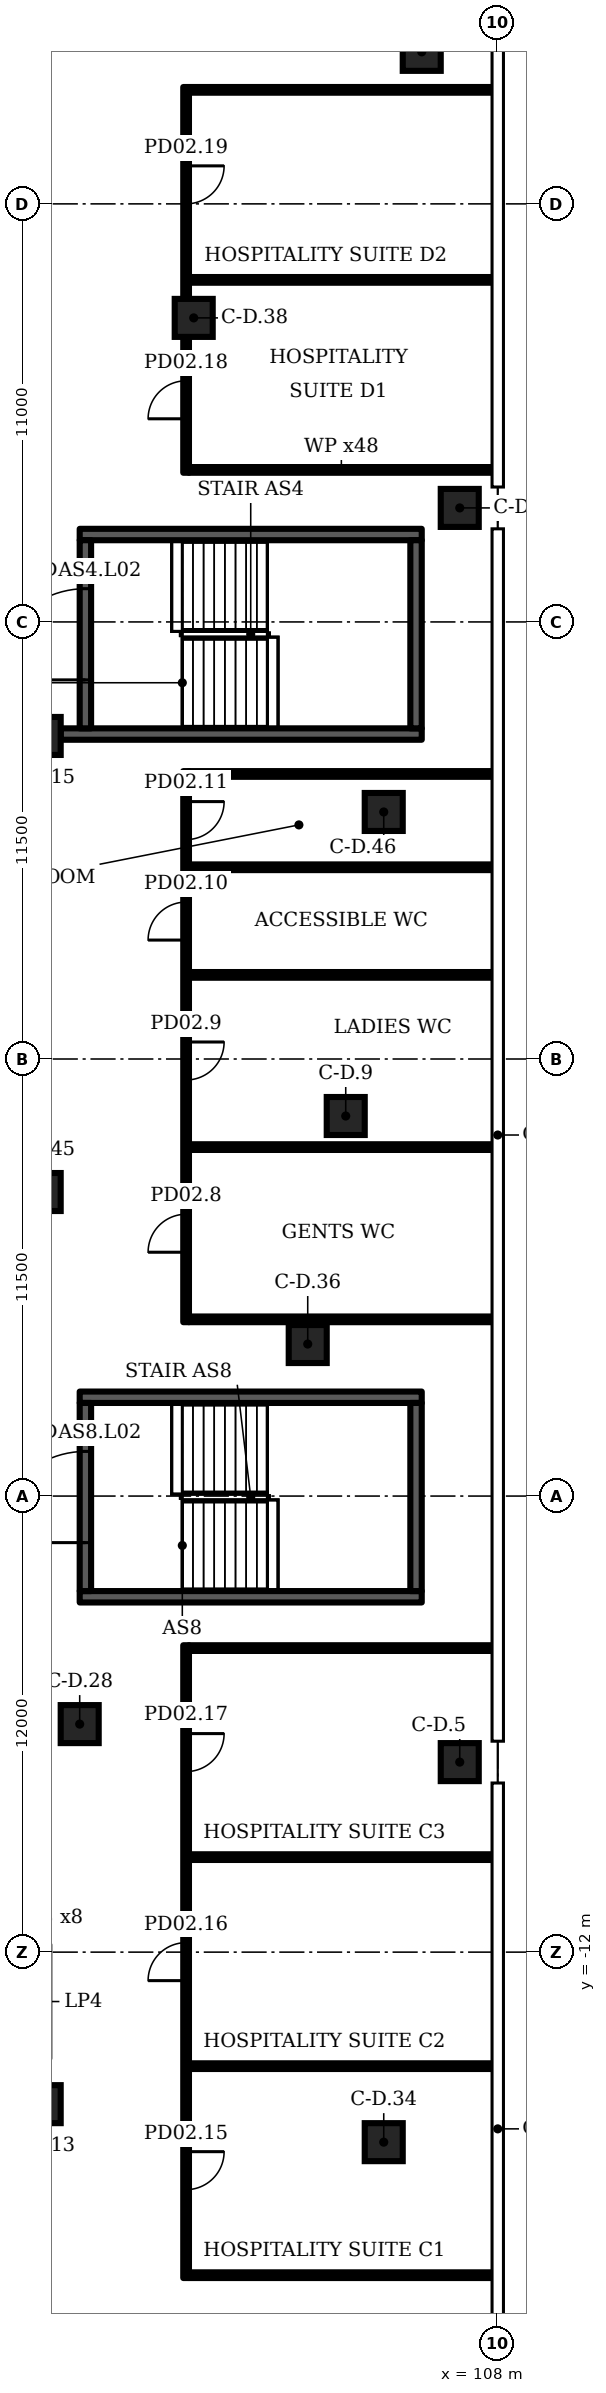
"""IFC4 building model, lengths in metres.
Left out: names, types, materials, properties, quantities, classifications, styles, units other than length and angle.
Written with IfcOpenShell. Run it as: python <this file> out.ifc"""

import sys

from ifc_helpers import new_model, si_unit, direction, frame, frame_2d, origin, origin_2d, place, context, subcontext, project, spatial, rectangle, extrude, element, fill, save


model = new_model("IFC4")
c1 = context("Model", 3, precision=1e-05, world=origin(), true_north=direction((0.0, 1.0)))
c2 = subcontext(c1, "Body", "Model", "MODEL_VIEW")
j1 = project(units=[si_unit("LENGTHUNIT", "METRE"), si_unit("PLANEANGLEUNIT", "RADIAN")], contexts=[c1])
p1 = place(None, origin())
s1 = spatial("IfcSite", under=j1, at=p1, CompositionType="ELEMENT")
p2 = place(p1, origin())
s2 = spatial("IfcBuilding", under=s1, at=p2, CompositionType="ELEMENT")
p3 = place(p2, frame((0.0, 0.0, 15.0)))
s3 = spatial("IfcBuildingStorey", under=s2, at=p3, CompositionType="ELEMENT", Elevation=15.0)
for number, where, z_axis, x_axis in (
    (1, (107.0, 26.0, 0.0), (0.0, 0.0, 1.0), (1.0, 0.0, 0.0)),
    (2, (107.0, -7.0, 0.0), (0.0, 0.0, 1.0), (1.0, 0.0, 0.0)),
    (3, (104.0, 10.0, 0.0), (0.0, 0.0, 1.0), (1.0, 0.0, 0.0)),
    (4, (96.0, -16.0, 0.0), (0.0, 0.0, 1.0), (1.0, 0.0, 0.0)),
    (5, (96.0, 20.0, 0.0), (0.0, 0.0, 1.0), (1.0, 0.0, 0.0)),
    (6, (106.0, 38.0, 0.0), (0.0, 0.0, 1.0), (1.0, 0.0, 0.0)),
    (7, (97.0, -6.0, 0.0), (0.0, 0.0, 1.0), (1.0, 0.0, 0.0)),
    (8, (105.0, -17.0, 0.0), (0.0, 0.0, 1.0), (1.0, 0.0, 0.0)),
    (9, (103.0, 4.0, 0.0), (0.0, 0.0, 1.0), (1.0, 0.0, 0.0)),
    (10, (100.0, 31.0, 0.0), (0.0, 0.0, 1.0), (1.0, 0.0, 0.0)),
    (11, (96.0, 8.0, 0.0), (0.0, 0.0, 1.0), (1.0, 0.0, 0.0)),
    (12, (105.0, 18.0, 0.0), (0.0, 0.0, 1.0), (1.0, 0.0, 0.0)),
):
    element("IfcColumn", number, at=place(p3, frame(where, z_axis=z_axis, x_axis=x_axis)), inside=s3, PredefinedType="COLUMN", context=c2, shape_type="SweptSolid", body=[
        extrude(rectangle(XDim=1.0, YDim=1.0, at=origin_2d()), origin(), (0.0, 0.0, 1.0), 6.5),
    ])
for number, where, z_axis, x_axis in (
    (13, (99.875, -20.5, 0.0), (0.0, 0.0, 1.0), (1.0, 0.0, 0.0)),
    (14, (99.875, -15.0, 0.0), (0.0, 0.0, 1.0), (1.0, 0.0, 0.0)),
    (15, (99.875, -9.5, 0.0), (0.0, 0.0, 1.0), (1.0, 0.0, 0.0)),
    (16, (99.875, -4.0, 0.0), (0.0, 0.0, 1.0), (1.0, 0.0, 0.0)),
    (17, (99.875, 19.0, 0.0), (0.0, 0.0, 1.0), (1.0, 0.0, 0.0)),
    (18, (99.875, 4.65, 0.0), (0.0, 0.0, 1.0), (1.0, 0.0, 0.0)),
    (19, (99.875, 9.182, 0.0), (0.0, 0.0, 1.0), (1.0, 0.0, 0.0)),
):
    element("IfcWall", number, at=place(p3, frame(where, z_axis=z_axis, x_axis=x_axis)), inside=s3, PredefinedType="PARTITIONING", context=c2, shape_type="SweptSolid", body=[
        extrude(rectangle(XDim=8.02, YDim=0.15, at=frame_2d((4.01, 0.0))), origin(), (0.0, 0.0, 1.0), 6.2),
    ])
p4 = place(p3, frame((99.8, -20.575, 0.0), z_axis=(0.0, 0.0, 1.0), x_axis=(0.0, 1.0, 0.0)))
e20 = element("IfcWall", 20, at=p4, inside=s3, PredefinedType="PARTITIONING", context=c2, shape_type="SweptSolid", body=[
    extrude(rectangle(XDim=16.65, YDim=0.15, at=frame_2d((8.325, 0.0))), origin(), (0.0, 0.0, 1.0), 6.2),
])
p5 = place(p4, frame((2.325, 0.0, 0.0)))
e21 = element("IfcOpeningElement", 21, at=p5, cuts=e20, PredefinedType="OPENING", context=c2, shape_type="SweptSolid", body=[
    extrude(rectangle(XDim=1.0, YDim=2.1, at=frame_2d((0.5, 1.05))), frame((0.0, 0.085, 0.0), z_axis=(0.0, -1.0, 0.0), x_axis=(1.0, 0.0, 0.0)), (0.0, 0.0, 1.0), 0.17),
])
p6 = place(p4, frame((7.825, 0.0, 0.0)))
e22 = element("IfcOpeningElement", 22, at=p6, cuts=e20, PredefinedType="OPENING", context=c2, shape_type="SweptSolid", body=[
    extrude(rectangle(XDim=1.0, YDim=2.1, at=frame_2d((0.5, 1.05))), frame((0.0, 0.085, 0.0), z_axis=(0.0, -1.0, 0.0), x_axis=(1.0, 0.0, 0.0)), (0.0, 0.0, 1.0), 0.17),
])
p7 = place(p4, frame((13.325, 0.0, 0.0)))
e23 = element("IfcOpeningElement", 23, at=p7, cuts=e20, PredefinedType="OPENING", context=c2, shape_type="SweptSolid", body=[
    extrude(rectangle(XDim=1.0, YDim=2.1, at=frame_2d((0.5, 1.05))), frame((0.0, 0.085, 0.0), z_axis=(0.0, -1.0, 0.0), x_axis=(1.0, 0.0, 0.0)), (0.0, 0.0, 1.0), 0.17),
])
p8 = place(p3, frame((99.8, 4.575, 0.0), z_axis=(0.0, 0.0, 1.0), x_axis=(0.0, 1.0, 0.0)))
e24 = element("IfcWall", 24, at=p8, inside=s3, PredefinedType="PARTITIONING", context=c2, shape_type="SweptSolid", body=[
    extrude(rectangle(XDim=14.5, YDim=0.15, at=frame_2d((7.25, 0.0))), origin(), (0.0, 0.0, 1.0), 6.2),
])
p9 = place(p8, frame((1.841, 0.0, 0.0)))
e25 = element("IfcOpeningElement", 25, at=p9, cuts=e24, PredefinedType="OPENING", context=c2, shape_type="SweptSolid", body=[
    extrude(rectangle(XDim=1.0, YDim=2.1, at=frame_2d((0.5, 1.05))), frame((0.0, 0.085, 0.0), z_axis=(0.0, -1.0, 0.0), x_axis=(1.0, 0.0, 0.0)), (0.0, 0.0, 1.0), 0.17),
])
p10 = place(p8, frame((6.372, 0.0, 0.0)))
e26 = element("IfcOpeningElement", 26, at=p10, cuts=e24, PredefinedType="OPENING", context=c2, shape_type="SweptSolid", body=[
    extrude(rectangle(XDim=1.0, YDim=2.1, at=frame_2d((0.5, 1.05))), frame((0.0, 0.085, 0.0), z_axis=(0.0, -1.0, 0.0), x_axis=(1.0, 0.0, 0.0)), (0.0, 0.0, 1.0), 0.17),
])
p11 = place(p8, frame((10.054, 0.0, 0.0)))
e27 = element("IfcOpeningElement", 27, at=p11, cuts=e24, PredefinedType="OPENING", context=c2, shape_type="SweptSolid", body=[
    extrude(rectangle(XDim=1.0, YDim=2.1, at=frame_2d((0.5, 1.05))), frame((0.0, 0.085, 0.0), z_axis=(0.0, -1.0, 0.0), x_axis=(1.0, 0.0, 0.0)), (0.0, 0.0, 1.0), 0.17),
])
p12 = place(p8, frame((12.698, 0.0, 0.0)))
e28 = element("IfcOpeningElement", 28, at=p12, cuts=e24, PredefinedType="OPENING", context=c2, shape_type="SweptSolid", body=[
    extrude(rectangle(XDim=1.0, YDim=2.1, at=frame_2d((0.5, 1.05))), frame((0.0, 0.085, 0.0), z_axis=(0.0, -1.0, 0.0), x_axis=(1.0, 0.0, 0.0)), (0.0, 0.0, 1.0), 0.17),
])
p13 = place(p3, frame((99.8, 26.925, 0.0), z_axis=(0.0, 0.0, 1.0), x_axis=(0.0, 1.0, 0.0)))
e29 = element("IfcWall", 29, at=p13, inside=s3, PredefinedType="PARTITIONING", context=c2, shape_type="SweptSolid", body=[
    extrude(rectangle(XDim=3.565, YDim=0.15, at=frame_2d((1.782, 0.0))), origin(), (0.0, 0.0, 1.0), 6.2),
])
p14 = place(p13, frame((1.42, 0.0, 0.0)))
e30 = element("IfcOpeningElement", 30, at=p14, cuts=e29, PredefinedType="OPENING", context=c2, shape_type="SweptSolid", body=[
    extrude(rectangle(XDim=1.0, YDim=2.1, at=frame_2d((0.5, 1.05))), frame((0.0, 0.085, 0.0), z_axis=(0.0, -1.0, 0.0), x_axis=(1.0, 0.0, 0.0)), (0.0, 0.0, 1.0), 0.17),
])
p15 = place(p3, frame((99.8, 31.51, 0.0), z_axis=(0.0, 0.0, 1.0), x_axis=(0.0, 1.0, 0.0)))
e31 = element("IfcWall", 31, at=p15, inside=s3, PredefinedType="PARTITIONING", context=c2, shape_type="SweptSolid", body=[
    extrude(rectangle(XDim=5.565, YDim=0.15, at=frame_2d((2.782, 0.0))), origin(), (0.0, 0.0, 1.0), 6.2),
])
p16 = place(p15, frame((2.49, 0.0, 0.0)))
e32 = element("IfcOpeningElement", 32, at=p16, cuts=e31, PredefinedType="OPENING", context=c2, shape_type="SweptSolid", body=[
    extrude(rectangle(XDim=1.0, YDim=2.1, at=frame_2d((0.5, 1.05))), frame((0.0, 0.085, 0.0), z_axis=(0.0, -1.0, 0.0), x_axis=(1.0, 0.0, 0.0)), (0.0, 0.0, 1.0), 0.17),
])
for number, where, z_axis, x_axis in (
    (33, (99.875, 13.713, 0.0), (0.0, 0.0, 1.0), (1.0, 0.0, 0.0)),
    (34, (99.875, 16.545, 0.0), (0.0, 0.0, 1.0), (1.0, 0.0, 0.0)),
    (35, (99.875, 27.0, 0.0), (0.0, 0.0, 1.0), (1.0, 0.0, 0.0)),
    (36, (99.875, 32.0, 0.0), (0.0, 0.0, 1.0), (1.0, 0.0, 0.0)),
    (37, (99.875, 37.0, 0.0), (0.0, 0.0, 1.0), (1.0, 0.0, 0.0)),
):
    element("IfcWall", number, at=place(p3, frame(where, z_axis=z_axis, x_axis=x_axis)), inside=s3, PredefinedType="PARTITIONING", context=c2, shape_type="SweptSolid", body=[
        extrude(rectangle(XDim=8.02, YDim=0.15, at=frame_2d((4.01, 0.0))), origin(), (0.0, 0.0, 1.0), 6.2),
    ])
for number, where, z_axis, x_axis in (
    (38, (97.0, -2.65, 0.0), (0.0, 0.0, 1.0), (1.0, 0.0, 0.0)),
    (39, (97.0, 2.6, 0.0), (0.0, 0.0, 1.0), (1.0, 0.0, 0.0)),
):
    element("IfcWall", number, at=place(p3, frame(where, z_axis=z_axis, x_axis=x_axis)), inside=s3, PredefinedType="SHEAR", context=c2, shape_type="SweptSolid", body=[
        extrude(rectangle(XDim=9.0, YDim=0.3, at=frame_2d((4.5, 0.0))), origin(), (0.0, 0.0, 1.0), 6.2),
    ])
p17 = place(p3, frame((97.15, -2.5, 0.0), z_axis=(0.0, 0.0, 1.0), x_axis=(0.0, 1.0, 0.0)))
e40 = element("IfcWall", 40, at=p17, inside=s3, PredefinedType="SHEAR", context=c2, shape_type="SweptSolid", body=[
    extrude(rectangle(XDim=4.95, YDim=0.3, at=frame_2d((2.475, 0.0))), origin(), (0.0, 0.0, 1.0), 6.2),
])
p18 = place(p17, frame((1.275, 0.0, 0.0)))
e41 = element("IfcOpeningElement", 41, at=p18, cuts=e40, PredefinedType="OPENING", context=c2, shape_type="SweptSolid", body=[
    extrude(rectangle(XDim=2.4, YDim=2.1, at=frame_2d((1.2, 1.05))), frame((0.0, 0.16, 0.0), z_axis=(0.0, -1.0, 0.0), x_axis=(1.0, 0.0, 0.0)), (0.0, 0.0, 1.0), 0.32),
])
p19 = place(p3, frame((105.85, -2.5, 0.0), z_axis=(0.0, 0.0, 1.0), x_axis=(0.0, 1.0, 0.0)))
e42 = element("IfcWall", 42, at=p19, inside=s3, PredefinedType="SHEAR", context=c2, shape_type="SweptSolid", body=[
    extrude(rectangle(XDim=4.95, YDim=0.3, at=frame_2d((2.475, 0.0))), origin(), (0.0, 0.0, 1.0), 6.2),
])
p20 = place(p3, frame((96.5, 20.05, 0.0), z_axis=(0.0, 0.0, 1.0), x_axis=(1.0, 0.0, 0.0)))
e43 = element("IfcWall", 43, at=p20, inside=s3, PredefinedType="SHEAR", context=c2, shape_type="SweptSolid", body=[
    extrude(rectangle(XDim=9.5, YDim=0.3, at=frame_2d((4.75, 0.0))), origin(), (0.0, 0.0, 1.0), 6.2),
])
p21 = place(p3, frame((97.0, 25.3, 0.0), z_axis=(0.0, 0.0, 1.0), x_axis=(1.0, 0.0, 0.0)))
e44 = element("IfcWall", 44, at=p21, inside=s3, PredefinedType="SHEAR", context=c2, shape_type="SweptSolid", body=[
    extrude(rectangle(XDim=9.0, YDim=0.3, at=frame_2d((4.5, 0.0))), origin(), (0.0, 0.0, 1.0), 6.2),
])
p22 = place(p3, frame((97.15, 20.2, 0.0), z_axis=(0.0, 0.0, 1.0), x_axis=(0.0, 1.0, 0.0)))
e45 = element("IfcWall", 45, at=p22, inside=s3, PredefinedType="SHEAR", context=c2, shape_type="SweptSolid", body=[
    extrude(rectangle(XDim=4.95, YDim=0.3, at=frame_2d((2.475, 0.0))), origin(), (0.0, 0.0, 1.0), 6.2),
])
p23 = place(p22, frame((1.275, 0.0, 0.0)))
e46 = element("IfcOpeningElement", 46, at=p23, cuts=e45, PredefinedType="OPENING", context=c2, shape_type="SweptSolid", body=[
    extrude(rectangle(XDim=2.4, YDim=2.1, at=frame_2d((1.2, 1.05))), frame((0.0, 0.16, 0.0), z_axis=(0.0, -1.0, 0.0), x_axis=(1.0, 0.0, 0.0)), (0.0, 0.0, 1.0), 0.32),
])
p24 = place(p3, frame((105.85, 20.2, 0.0), z_axis=(0.0, 0.0, 1.0), x_axis=(0.0, 1.0, 0.0)))
e47 = element("IfcWall", 47, at=p24, inside=s3, PredefinedType="SHEAR", context=c2, shape_type="SweptSolid", body=[
    extrude(rectangle(XDim=4.95, YDim=0.3, at=frame_2d((2.475, 0.0))), origin(), (0.0, 0.0, 1.0), 6.2),
])
p25 = place(p9, origin())
e48 = element("IfcDoor", 48, at=p25, inside=s3, OperationType="SINGLE_SWING_LEFT", PredefinedType="DOOR", context=c2, shape_type="SweptSolid", body=[
    extrude(rectangle(XDim=1.0, YDim=2.1, at=frame_2d((0.5, 1.05))), frame((0.0, 0.025, 0.0), z_axis=(0.0, -1.0, 0.0), x_axis=(1.0, 0.0, 0.0)), (0.0, 0.0, 1.0), 0.05),
])
fill(e25, e48)
p26 = place(p10, origin())
e49 = element("IfcDoor", 49, at=p26, inside=s3, OperationType="SINGLE_SWING_RIGHT", PredefinedType="DOOR", context=c2, shape_type="SweptSolid", body=[
    extrude(rectangle(XDim=1.0, YDim=2.1, at=frame_2d((0.5, 1.05))), frame((0.0, 0.025, 0.0), z_axis=(0.0, -1.0, 0.0), x_axis=(1.0, 0.0, 0.0)), (0.0, 0.0, 1.0), 0.05),
])
fill(e26, e49)
p27 = place(p11, origin())
e50 = element("IfcDoor", 50, at=p27, inside=s3, OperationType="SINGLE_SWING_LEFT", PredefinedType="DOOR", context=c2, shape_type="SweptSolid", body=[
    extrude(rectangle(XDim=1.0, YDim=2.1, at=frame_2d((0.5, 1.05))), frame((0.0, 0.025, 0.0), z_axis=(0.0, -1.0, 0.0), x_axis=(1.0, 0.0, 0.0)), (0.0, 0.0, 1.0), 0.05),
])
fill(e27, e50)
p28 = place(p12, origin())
e51 = element("IfcDoor", 51, at=p28, inside=s3, OperationType="SINGLE_SWING_RIGHT", PredefinedType="DOOR", context=c2, shape_type="SweptSolid", body=[
    extrude(rectangle(XDim=1.0, YDim=2.1, at=frame_2d((0.5, 1.05))), frame((0.0, 0.025, 0.0), z_axis=(0.0, -1.0, 0.0), x_axis=(1.0, 0.0, 0.0)), (0.0, 0.0, 1.0), 0.05),
])
fill(e28, e51)
p29 = place(p5, origin())
e52 = element("IfcDoor", 52, at=p29, inside=s3, OperationType="SINGLE_SWING_RIGHT", PredefinedType="DOOR", context=c2, shape_type="SweptSolid", body=[
    extrude(rectangle(XDim=1.0, YDim=2.1, at=frame_2d((0.5, 1.05))), frame((0.0, 0.025, 0.0), z_axis=(0.0, -1.0, 0.0), x_axis=(1.0, 0.0, 0.0)), (0.0, 0.0, 1.0), 0.05),
])
fill(e21, e52)
p30 = place(p6, origin())
e53 = element("IfcDoor", 53, at=p30, inside=s3, OperationType="SINGLE_SWING_LEFT", PredefinedType="DOOR", context=c2, shape_type="SweptSolid", body=[
    extrude(rectangle(XDim=1.0, YDim=2.1, at=frame_2d((0.5, 1.05))), frame((0.0, 0.025, 0.0), z_axis=(0.0, -1.0, 0.0), x_axis=(1.0, 0.0, 0.0)), (0.0, 0.0, 1.0), 0.05),
])
fill(e22, e53)
p31 = place(p7, origin())
e54 = element("IfcDoor", 54, at=p31, inside=s3, OperationType="SINGLE_SWING_RIGHT", PredefinedType="DOOR", context=c2, shape_type="SweptSolid", body=[
    extrude(rectangle(XDim=1.0, YDim=2.1, at=frame_2d((0.5, 1.05))), frame((0.0, 0.025, 0.0), z_axis=(0.0, -1.0, 0.0), x_axis=(1.0, 0.0, 0.0)), (0.0, 0.0, 1.0), 0.05),
])
fill(e23, e54)
p32 = place(p14, origin())
e55 = element("IfcDoor", 55, at=p32, inside=s3, OperationType="SINGLE_SWING_LEFT", PredefinedType="DOOR", context=c2, shape_type="SweptSolid", body=[
    extrude(rectangle(XDim=1.0, YDim=2.1, at=frame_2d((0.5, 1.05))), frame((0.0, 0.025, 0.0), z_axis=(0.0, -1.0, 0.0), x_axis=(1.0, 0.0, 0.0)), (0.0, 0.0, 1.0), 0.05),
])
fill(e30, e55)
p33 = place(p16, origin())
e56 = element("IfcDoor", 56, at=p33, inside=s3, OperationType="SINGLE_SWING_RIGHT", PredefinedType="DOOR", context=c2, shape_type="SweptSolid", body=[
    extrude(rectangle(XDim=1.0, YDim=2.1, at=frame_2d((0.5, 1.05))), frame((0.0, 0.025, 0.0), z_axis=(0.0, -1.0, 0.0), x_axis=(1.0, 0.0, 0.0)), (0.0, 0.0, 1.0), 0.05),
])
fill(e32, e56)
p34 = place(p18, origin())
e57 = element("IfcDoor", 57, at=p34, inside=s3, OperationType="DOUBLE_DOOR_SINGLE_SWING", PredefinedType="DOOR", context=c2, shape_type="SweptSolid", body=[
    extrude(rectangle(XDim=2.4, YDim=2.1, at=frame_2d((1.2, 1.05))), frame((0.0, 0.025, 0.0), z_axis=(0.0, -1.0, 0.0), x_axis=(1.0, 0.0, 0.0)), (0.0, 0.0, 1.0), 0.05),
])
fill(e41, e57)
p35 = place(p23, origin())
e58 = element("IfcDoor", 58, at=p35, inside=s3, OperationType="DOUBLE_DOOR_SINGLE_SWING", PredefinedType="DOOR", context=c2, shape_type="SweptSolid", body=[
    extrude(rectangle(XDim=2.4, YDim=2.1, at=frame_2d((1.2, 1.05))), frame((0.0, 0.025, 0.0), z_axis=(0.0, -1.0, 0.0), x_axis=(1.0, 0.0, 0.0)), (0.0, 0.0, 1.0), 0.05),
])
fill(e46, e58)
save(model, sys.argv[1])
